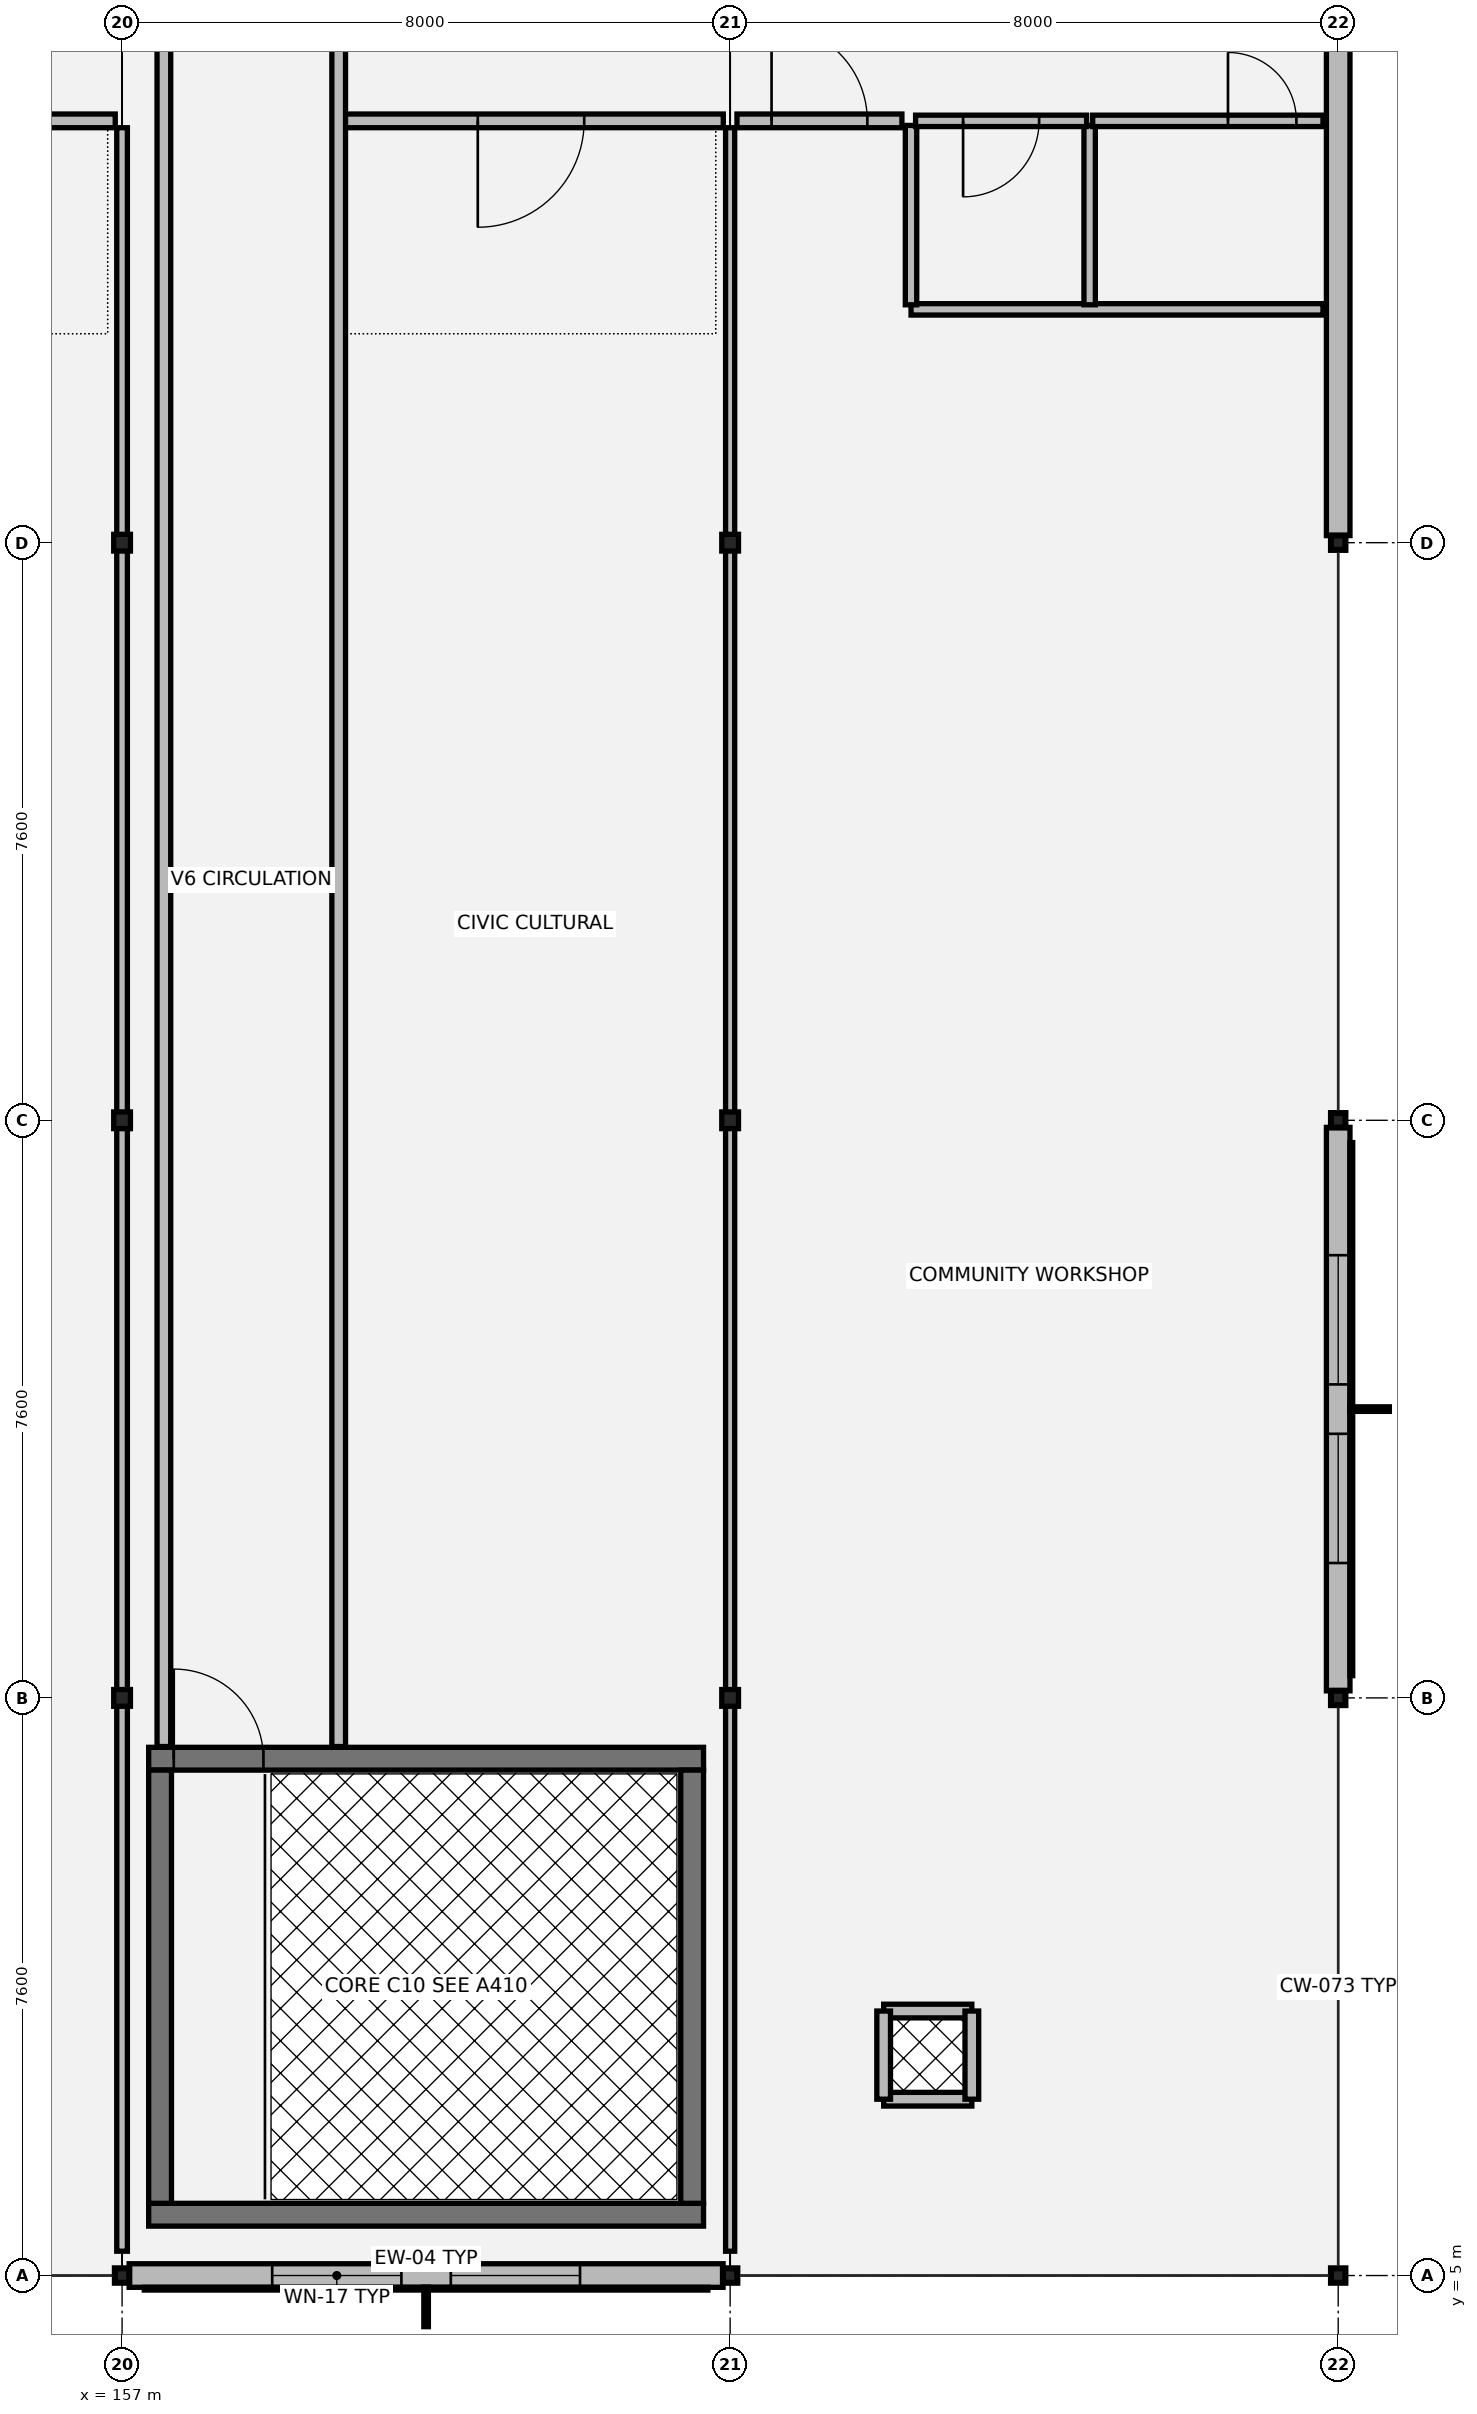
"""IFC4 building model, lengths in metres.
Left out: names, types, materials, properties, quantities, classifications, styles, units other than length and angle.
Written with IfcOpenShell. Run it as: python <this file> out.ifc"""

import sys

from ifc_helpers import new_model, si_unit, direction, frame, frame_2d, origin, origin_2d, place, context, subcontext, project, spatial, rectangle, hollow_rectangle, i_section, extrude, element, fill, save


model = new_model("IFC4")
c1 = context("Model", 3, precision=1e-05, world=origin(), true_north=direction((0.0, 1.0)))
c2 = subcontext(c1, "Body", "Model", "MODEL_VIEW")
j1 = project(units=[si_unit("LENGTHUNIT", "METRE"), si_unit("PLANEANGLEUNIT", "RADIAN")], contexts=[c1])
p1 = place(None, origin())
s1 = spatial("IfcSite", under=j1, at=p1, CompositionType="ELEMENT")
p2 = place(p1, origin())
s2 = spatial("IfcBuilding", under=s1, at=p2, CompositionType="ELEMENT")
p3 = place(p2, frame((0.0, 0.0, 17.34)))
s3 = spatial("IfcBuildingStorey", under=s2, at=p3, CompositionType="ELEMENT", Elevation=17.34)
p4 = place(p3, frame((157.0, 5.0, 0.0), z_axis=(0.0, 0.0, 1.0), x_axis=(1.0, 0.0, 0.0)))
e1 = element("IfcColumn", 1, at=p4, inside=s3, PredefinedType="COLUMN", context=c2, shape_type="SweptSolid", body=[
    extrude(hollow_rectangle(XDim=0.18, YDim=0.18, WallThickness=0.01, at=origin_2d()), origin(), (0.0, 0.0, 1.0), 3.89),
])
for number, where, z_axis, x_axis in (
    (2, (157.0, 12.6, 0.0), (0.0, 0.0, 1.0), (1.0, 0.0, 0.0)),
    (3, (157.0, 20.2, 0.0), (0.0, 0.0, 1.0), (1.0, 0.0, 0.0)),
    (4, (157.0, 27.8, 0.0), (0.0, 0.0, 1.0), (1.0, 0.0, 0.0)),
):
    element("IfcColumn", number, at=place(p3, frame(where, z_axis=z_axis, x_axis=x_axis)), inside=s3, PredefinedType="COLUMN", context=c2, shape_type="SweptSolid", body=[
        extrude(i_section(OverallWidth=0.22, OverallDepth=0.22, WebThickness=0.01, FlangeThickness=0.016, at=origin_2d()), origin(), (0.0, 0.0, 1.0), 3.89),
    ])
p5 = place(p3, frame((165.0, 5.0, 0.0), z_axis=(0.0, 0.0, 1.0), x_axis=(1.0, 0.0, 0.0)))
e5 = element("IfcColumn", 5, at=p5, inside=s3, PredefinedType="COLUMN", context=c2, shape_type="SweptSolid", body=[
    extrude(hollow_rectangle(XDim=0.18, YDim=0.18, WallThickness=0.01, at=origin_2d()), origin(), (0.0, 0.0, 1.0), 3.89),
])
for number, where, z_axis, x_axis in (
    (6, (165.0, 12.6, 0.0), (0.0, 0.0, 1.0), (1.0, 0.0, 0.0)),
    (7, (165.0, 20.2, 0.0), (0.0, 0.0, 1.0), (1.0, 0.0, 0.0)),
    (8, (165.0, 27.8, 0.0), (0.0, 0.0, 1.0), (1.0, 0.0, 0.0)),
):
    element("IfcColumn", number, at=place(p3, frame(where, z_axis=z_axis, x_axis=x_axis)), inside=s3, PredefinedType="COLUMN", context=c2, shape_type="SweptSolid", body=[
        extrude(i_section(OverallWidth=0.22, OverallDepth=0.22, WebThickness=0.01, FlangeThickness=0.016, at=origin_2d()), origin(), (0.0, 0.0, 1.0), 3.89),
    ])
for number, where, z_axis, x_axis in (
    (9, (173.0, 5.0, 0.0), (0.0, 0.0, 1.0), (1.0, 0.0, 0.0)),
    (10, (173.0, 12.6, 0.0), (0.0, 0.0, 1.0), (1.0, 0.0, 0.0)),
    (11, (173.0, 20.2, 0.0), (0.0, 0.0, 1.0), (1.0, 0.0, 0.0)),
    (12, (173.0, 27.8, 0.0), (0.0, 0.0, 1.0), (1.0, 0.0, 0.0)),
):
    element("IfcColumn", number, at=place(p3, frame(where, z_axis=z_axis, x_axis=x_axis)), inside=s3, PredefinedType="COLUMN", context=c2, shape_type="SweptSolid", body=[
        extrude(hollow_rectangle(XDim=0.18, YDim=0.18, WallThickness=0.01, at=origin_2d()), origin(), (0.0, 0.0, 1.0), 3.89),
    ])
p6 = place(p3, frame((157.093, 5.0, 0.0), z_axis=(0.0, 0.0, 1.0), x_axis=(1.0, 0.0, 0.0)))
e13 = element("IfcWall", 13, at=p6, inside=s3, PredefinedType="SOLIDWALL", context=c2, shape_type="SweptSolid", body=[
    extrude(rectangle(XDim=7.814, YDim=0.31, at=frame_2d((3.907, 0.0))), origin(), (0.0, 0.0, 1.0), 3.48),
])
p7 = place(p6, frame((1.882, 0.0, 0.8)))
e14 = element("IfcOpeningElement", 14, at=p7, cuts=e13, PredefinedType="OPENING", context=c2, shape_type="SweptSolid", body=[
    extrude(rectangle(XDim=1.7, YDim=2.2, at=frame_2d((0.85, 1.1))), frame((0.0, 0.165, 0.0), z_axis=(0.0, -1.0, 0.0), x_axis=(1.0, 0.0, 0.0)), (0.0, 0.0, 1.0), 0.33),
])
p8 = place(p6, frame((4.232, 0.0, 0.8)))
e15 = element("IfcOpeningElement", 15, at=p8, cuts=e13, PredefinedType="OPENING", context=c2, shape_type="SweptSolid", body=[
    extrude(rectangle(XDim=1.7, YDim=2.2, at=frame_2d((0.85, 1.1))), frame((0.0, 0.165, 0.0), z_axis=(0.0, -1.0, 0.0), x_axis=(1.0, 0.0, 0.0)), (0.0, 0.0, 1.0), 0.33),
])
p9 = place(p3, frame((173.0, 12.693, 0.0), z_axis=(0.0, 0.0, 1.0), x_axis=(0.0, 1.0, 0.0)))
e16 = element("IfcWall", 16, at=p9, inside=s3, PredefinedType="SOLIDWALL", context=c2, shape_type="SweptSolid", body=[
    extrude(rectangle(XDim=7.414, YDim=0.31, at=frame_2d((3.707, 0.0))), origin(), (0.0, 0.0, 1.0), 3.48),
])
p10 = place(p9, frame((1.682, 0.0, 0.8)))
e17 = element("IfcOpeningElement", 17, at=p10, cuts=e16, PredefinedType="OPENING", context=c2, shape_type="SweptSolid", body=[
    extrude(rectangle(XDim=1.7, YDim=2.2, at=frame_2d((0.85, 1.1))), frame((0.0, 0.165, 0.0), z_axis=(0.0, -1.0, 0.0), x_axis=(1.0, 0.0, 0.0)), (0.0, 0.0, 1.0), 0.33),
])
p11 = place(p9, frame((4.032, 0.0, 0.8)))
e18 = element("IfcOpeningElement", 18, at=p11, cuts=e16, PredefinedType="OPENING", context=c2, shape_type="SweptSolid", body=[
    extrude(rectangle(XDim=1.7, YDim=2.2, at=frame_2d((0.85, 1.1))), frame((0.0, 0.165, 0.0), z_axis=(0.0, -1.0, 0.0), x_axis=(1.0, 0.0, 0.0)), (0.0, 0.0, 1.0), 0.33),
])
p12 = place(p3, frame((173.0, 27.893, 0.0), z_axis=(0.0, 0.0, 1.0), x_axis=(0.0, 1.0, 0.0)))
e19 = element("IfcWall", 19, at=p12, inside=s3, PredefinedType="SOLIDWALL", context=c2, shape_type="SweptSolid", body=[
    extrude(rectangle(XDim=7.414, YDim=0.31, at=frame_2d((3.707, 0.0))), origin(), (0.0, 0.0, 1.0), 3.48),
])
p13 = place(p3, frame((157.35, 5.8, 0.0), z_axis=(0.0, 0.0, 1.0), x_axis=(1.0, 0.0, 0.0)))
e20 = element("IfcWall", 20, at=p13, inside=s3, PredefinedType="SHEAR", context=c2, shape_type="SweptSolid", body=[
    extrude(rectangle(XDim=7.3, YDim=0.3, at=frame_2d((3.65, 0.0))), origin(), (0.0, 0.0, 1.0), 3.845),
])
p14 = place(p3, frame((157.35, 11.8, 0.0), z_axis=(0.0, 0.0, 1.0), x_axis=(1.0, 0.0, 0.0)))
e21 = element("IfcWall", 21, at=p14, inside=s3, PredefinedType="SHEAR", context=c2, shape_type="SweptSolid", body=[
    extrude(rectangle(XDim=7.3, YDim=0.3, at=frame_2d((3.65, 0.0))), origin(), (0.0, 0.0, 1.0), 3.845),
])
p15 = place(p14, frame((0.33, 0.0, 0.0)))
e22 = element("IfcOpeningElement", 22, at=p15, cuts=e21, PredefinedType="OPENING", context=c2, shape_type="SweptSolid", body=[
    extrude(rectangle(XDim=1.18, YDim=2.18, at=frame_2d((0.59, 1.09))), frame((0.0, 0.16, 0.0), z_axis=(0.0, -1.0, 0.0), x_axis=(1.0, 0.0, 0.0)), (0.0, 0.0, 1.0), 0.32),
])
for number, where, z_axis, x_axis in (
    (23, (157.5, 5.95, 0.0), (0.0, 0.0, 1.0), (0.0, 1.0, 0.0)),
    (24, (164.5, 5.95, 0.0), (0.0, 0.0, 1.0), (0.0, 1.0, 0.0)),
):
    element("IfcWall", number, at=place(p3, frame(where, z_axis=z_axis, x_axis=x_axis)), inside=s3, PredefinedType="SHEAR", context=c2, shape_type="SweptSolid", body=[
        extrude(rectangle(XDim=5.7, YDim=0.3, at=frame_2d((2.85, 0.0))), origin(), (0.0, 0.0, 1.0), 3.845),
    ])
for number, where, z_axis, x_axis in (
    (25, (167.02, 7.32, 0.0), (0.0, 0.0, 1.0), (1.0, 0.0, 0.0)),
    (26, (168.18, 8.48, 0.0), (0.0, 0.0, 1.0), (-1.0, 0.0, 0.0)),
    (27, (167.02, 8.48, 0.0), (0.0, 0.0, 1.0), (0.0, -1.0, 0.0)),
    (28, (168.18, 7.32, 0.0), (0.0, 0.0, 1.0), (0.0, 1.0, 0.0)),
):
    element("IfcWall", number, at=place(p3, frame(where, z_axis=z_axis, x_axis=x_axis)), inside=s3, PredefinedType="PARTITIONING", context=c2, shape_type="SweptSolid", body=[
        extrude(rectangle(XDim=1.16, YDim=0.18, at=frame_2d((0.58, 0.0))), origin(), (0.0, 0.0, 1.0), 3.18),
    ])
p16 = place(p3, frame((167.38, 30.87, 0.0), z_axis=(0.0, 0.0, 1.0), x_axis=(1.0, 0.0, 0.0)))
e29 = element("IfcWall", 29, at=p16, inside=s3, PredefinedType="PARTITIONING", context=c2, shape_type="SweptSolid", body=[
    extrude(rectangle(XDim=5.42, YDim=0.15, at=frame_2d((2.71, 0.0))), origin(), (0.0, 0.0, 1.0), 3.18),
])
for number, where, z_axis, x_axis in (
    (30, (167.38, 30.93, 0.0), (0.0, 0.0, 1.0), (0.0, 1.0, 0.0)),
    (31, (169.73, 30.93, 0.0), (0.0, 0.0, 1.0), (0.0, 1.0, 0.0)),
):
    element("IfcWall", number, at=place(p3, frame(where, z_axis=z_axis, x_axis=x_axis)), inside=s3, PredefinedType="PARTITIONING", context=c2, shape_type="SweptSolid", body=[
        extrude(rectangle(XDim=2.36, YDim=0.15, at=frame_2d((1.18, 0.0))), origin(), (0.0, 0.0, 1.0), 3.18),
    ])
p17 = place(p3, frame((167.44, 33.35, 0.0), z_axis=(0.0, 0.0, 1.0), x_axis=(1.0, 0.0, 0.0)))
e32 = element("IfcWall", 32, at=p17, inside=s3, PredefinedType="PARTITIONING", context=c2, shape_type="SweptSolid", body=[
    extrude(rectangle(XDim=2.25, YDim=0.15, at=frame_2d((1.125, 0.0))), origin(), (0.0, 0.0, 1.0), 3.18),
])
p18 = place(p17, frame((0.625, 0.0, 0.0)))
e33 = element("IfcOpeningElement", 33, at=p18, cuts=e32, PredefinedType="OPENING", context=c2, shape_type="SweptSolid", body=[
    extrude(rectangle(XDim=1.0, YDim=2.15, at=frame_2d((0.5, 1.075))), frame((0.0, 0.085, 0.0), z_axis=(0.0, -1.0, 0.0), x_axis=(1.0, 0.0, 0.0)), (0.0, 0.0, 1.0), 0.17),
])
p19 = place(p3, frame((169.77, 33.35, 0.0), z_axis=(0.0, 0.0, 1.0), x_axis=(1.0, 0.0, 0.0)))
e34 = element("IfcWall", 34, at=p19, inside=s3, PredefinedType="PARTITIONING", context=c2, shape_type="SweptSolid", body=[
    extrude(rectangle(XDim=3.03, YDim=0.15, at=frame_2d((1.515, 0.0))), origin(), (0.0, 0.0, 1.0), 3.18),
])
p20 = place(p19, frame((1.78, 0.0, 0.0)))
e35 = element("IfcOpeningElement", 35, at=p20, cuts=e34, PredefinedType="OPENING", context=c2, shape_type="SweptSolid", body=[
    extrude(rectangle(XDim=0.9, YDim=2.15, at=frame_2d((0.45, 1.075))), frame((0.0, 0.085, 0.0), z_axis=(0.0, -1.0, 0.0), x_axis=(1.0, 0.0, 0.0)), (0.0, 0.0, 1.0), 0.17),
])
p21 = place(p3, frame((149.2, 33.35, 0.0), z_axis=(0.0, 0.0, 1.0), x_axis=(1.0, 0.0, 0.0)))
e36 = element("IfcWall", 36, at=p21, inside=s3, PredefinedType="PARTITIONING", context=c2, shape_type="SweptSolid", body=[
    extrude(rectangle(XDim=7.71, YDim=0.18, at=frame_2d((3.855, 0.0))), origin(), (0.0, 0.0, 1.0), 3.18),
])
p22 = place(p21, frame((3.055, 0.0, 0.0)))
e37 = element("IfcOpeningElement", 37, at=p22, cuts=e36, PredefinedType="OPENING", context=c2, shape_type="SweptSolid", body=[
    extrude(rectangle(XDim=1.6, YDim=2.25, at=frame_2d((0.8, 1.125))), frame((0.0, 0.1, 0.0), z_axis=(0.0, -1.0, 0.0), x_axis=(1.0, 0.0, 0.0)), (0.0, 0.0, 1.0), 0.2),
])
p23 = place(p3, frame((159.85, 33.35, 0.0), z_axis=(0.0, 0.0, 1.0), x_axis=(1.0, 0.0, 0.0)))
e38 = element("IfcWall", 38, at=p23, inside=s3, PredefinedType="PARTITIONING", context=c2, shape_type="SweptSolid", body=[
    extrude(rectangle(XDim=5.06, YDim=0.18, at=frame_2d((2.53, 0.0))), origin(), (0.0, 0.0, 1.0), 3.18),
])
p24 = place(p23, frame((1.83, 0.0, 0.0)))
e39 = element("IfcOpeningElement", 39, at=p24, cuts=e38, PredefinedType="OPENING", context=c2, shape_type="SweptSolid", body=[
    extrude(rectangle(XDim=1.4, YDim=2.22, at=frame_2d((0.7, 1.11))), frame((0.0, 0.1, 0.0), z_axis=(0.0, -1.0, 0.0), x_axis=(1.0, 0.0, 0.0)), (0.0, 0.0, 1.0), 0.2),
])
p25 = place(p3, frame((165.09, 33.35, 0.0), z_axis=(0.0, 0.0, 1.0), x_axis=(1.0, 0.0, 0.0)))
e40 = element("IfcWall", 40, at=p25, inside=s3, PredefinedType="PARTITIONING", context=c2, shape_type="SweptSolid", body=[
    extrude(rectangle(XDim=2.17, YDim=0.18, at=frame_2d((1.085, 0.0))), origin(), (0.0, 0.0, 1.0), 3.18),
])
p26 = place(p25, frame((0.455, 0.0, 0.0)))
e41 = element("IfcOpeningElement", 41, at=p26, cuts=e40, PredefinedType="OPENING", context=c2, shape_type="SweptSolid", body=[
    extrude(rectangle(XDim=1.26, YDim=2.2, at=frame_2d((0.63, 1.1))), frame((0.0, 0.1, 0.0), z_axis=(0.0, -1.0, 0.0), x_axis=(1.0, 0.0, 0.0)), (0.0, 0.0, 1.0), 0.2),
])
for number, where, z_axis, x_axis in (
    (42, (157.55, 11.96, 0.0), (0.0, 0.0, 1.0), (0.0, 1.0, 0.0)),
    (43, (159.85, 11.96, 0.0), (0.0, 0.0, 1.0), (0.0, 1.0, 0.0)),
):
    element("IfcWall", number, at=place(p3, frame(where, z_axis=z_axis, x_axis=x_axis)), inside=s3, PredefinedType="PARTITIONING", context=c2, shape_type="SweptSolid", body=[
        extrude(rectangle(XDim=24.08, YDim=0.18, at=frame_2d((12.04, 0.0))), origin(), (0.0, 0.0, 1.0), 3.18),
    ])
p27 = place(p3, frame((157.0, 5.32, 0.0), z_axis=(0.0, 0.0, 1.0), x_axis=(0.0, 1.0, 0.0)))
e44 = element("IfcWall", 44, at=p27, inside=s3, PredefinedType="PARTITIONING", context=c2, shape_type="SweptSolid", body=[
    extrude(rectangle(XDim=27.94, YDim=0.14, at=frame_2d((13.97, 0.0))), origin(), (0.0, 0.0, 1.0), 3.18),
])
p28 = place(p3, frame((165.0, 5.32, 0.0), z_axis=(0.0, 0.0, 1.0), x_axis=(0.0, 1.0, 0.0)))
e45 = element("IfcWall", 45, at=p28, inside=s3, PredefinedType="PARTITIONING", context=c2, shape_type="SweptSolid", body=[
    extrude(rectangle(XDim=27.94, YDim=0.12, at=frame_2d((13.97, 0.0))), origin(), (0.0, 0.0, 1.0), 3.18),
])
p29 = place(p7, origin())
e46 = element("IfcWindow", 46, at=p29, inside=s3, PartitioningType="SINGLE_PANEL", PredefinedType="WINDOW", context=c2, shape_type="SweptSolid", body=[
    extrude(rectangle(XDim=1.7, YDim=2.2, at=frame_2d((0.85, 1.1))), frame((0.0, 0.03, 0.0), z_axis=(0.0, -1.0, 0.0), x_axis=(1.0, 0.0, 0.0)), (0.0, 0.0, 1.0), 0.06),
])
fill(e14, e46)
p30 = place(p8, origin())
e47 = element("IfcWindow", 47, at=p30, inside=s3, PartitioningType="SINGLE_PANEL", PredefinedType="WINDOW", context=c2, shape_type="SweptSolid", body=[
    extrude(rectangle(XDim=1.7, YDim=2.2, at=frame_2d((0.85, 1.1))), frame((0.0, 0.03, 0.0), z_axis=(0.0, -1.0, 0.0), x_axis=(1.0, 0.0, 0.0)), (0.0, 0.0, 1.0), 0.06),
])
fill(e15, e47)
p31 = place(p10, origin())
e48 = element("IfcWindow", 48, at=p31, inside=s3, PartitioningType="SINGLE_PANEL", PredefinedType="WINDOW", context=c2, shape_type="SweptSolid", body=[
    extrude(rectangle(XDim=1.7, YDim=2.2, at=frame_2d((0.85, 1.1))), frame((0.0, 0.03, 0.0), z_axis=(0.0, -1.0, 0.0), x_axis=(1.0, 0.0, 0.0)), (0.0, 0.0, 1.0), 0.06),
])
fill(e17, e48)
p32 = place(p11, origin())
e49 = element("IfcWindow", 49, at=p32, inside=s3, PartitioningType="SINGLE_PANEL", PredefinedType="WINDOW", context=c2, shape_type="SweptSolid", body=[
    extrude(rectangle(XDim=1.7, YDim=2.2, at=frame_2d((0.85, 1.1))), frame((0.0, 0.03, 0.0), z_axis=(0.0, -1.0, 0.0), x_axis=(1.0, 0.0, 0.0)), (0.0, 0.0, 1.0), 0.06),
])
fill(e18, e49)
p33 = place(p15, origin())
e50 = element("IfcDoor", 50, at=p33, inside=s3, OperationType="SINGLE_SWING_LEFT", PredefinedType="DOOR", context=c2, shape_type="SweptSolid", body=[
    extrude(rectangle(XDim=1.18, YDim=2.18, at=frame_2d((0.59, 1.09))), frame((0.0, 0.025, 0.0), z_axis=(0.0, -1.0, 0.0), x_axis=(1.0, 0.0, 0.0)), (0.0, 0.0, 1.0), 0.05),
])
fill(e22, e50)
p34 = place(p18, origin())
e51 = element("IfcDoor", 51, at=p34, inside=s3, OperationType="SINGLE_SWING_RIGHT", PredefinedType="DOOR", context=c2, shape_type="SweptSolid", body=[
    extrude(rectangle(XDim=1.0, YDim=2.15, at=frame_2d((0.5, 1.075))), frame((0.0, 0.025, 0.0), z_axis=(0.0, -1.0, 0.0), x_axis=(1.0, 0.0, 0.0)), (0.0, 0.0, 1.0), 0.05),
])
fill(e33, e51)
p35 = place(p20, origin())
e52 = element("IfcDoor", 52, at=p35, inside=s3, OperationType="SINGLE_SWING_LEFT", PredefinedType="DOOR", context=c2, shape_type="SweptSolid", body=[
    extrude(rectangle(XDim=0.9, YDim=2.15, at=frame_2d((0.45, 1.075))), frame((0.0, 0.025, 0.0), z_axis=(0.0, -1.0, 0.0), x_axis=(1.0, 0.0, 0.0)), (0.0, 0.0, 1.0), 0.05),
])
fill(e35, e52)
p36 = place(p24, origin())
e53 = element("IfcDoor", 53, at=p36, inside=s3, OperationType="SINGLE_SWING_RIGHT", PredefinedType="DOOR", context=c2, shape_type="SweptSolid", body=[
    extrude(rectangle(XDim=1.4, YDim=2.22, at=frame_2d((0.7, 1.11))), frame((0.0, 0.025, 0.0), z_axis=(0.0, -1.0, 0.0), x_axis=(1.0, 0.0, 0.0)), (0.0, 0.0, 1.0), 0.05),
])
fill(e39, e53)
p37 = place(p26, origin())
e54 = element("IfcDoor", 54, at=p37, inside=s3, OperationType="SINGLE_SWING_LEFT", PredefinedType="DOOR", context=c2, shape_type="SweptSolid", body=[
    extrude(rectangle(XDim=1.26, YDim=2.2, at=frame_2d((0.63, 1.1))), frame((0.0, 0.025, 0.0), z_axis=(0.0, -1.0, 0.0), x_axis=(1.0, 0.0, 0.0)), (0.0, 0.0, 1.0), 0.05),
])
fill(e41, e54)
save(model, sys.argv[1])
